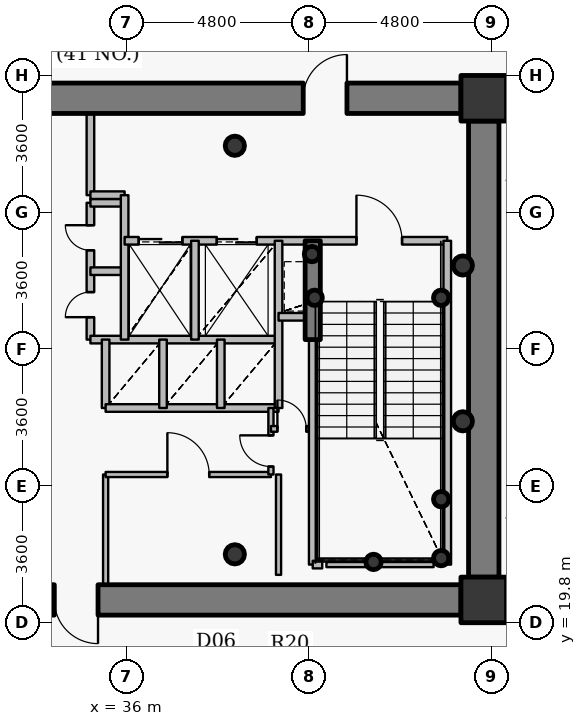
"""IFC4 building model, lengths in metres.
Left out: names, types, materials, properties, quantities, classifications, styles, units other than length and angle.
Written with IfcOpenShell. Run it as: python <this file> out.ifc"""

import sys

from ifc_helpers import new_model, si_unit, direction, frame, frame_2d, origin, origin_2d, place, context, subcontext, project, spatial, rectangle, hollow_circle, extrude, source, transform, mapped, element, fill, save


model = new_model("IFC4")
c1 = context("Model", 3, precision=1e-05, world=origin(), true_north=direction((0.0, 1.0)))
c2 = subcontext(c1, "Body", "Model", "MODEL_VIEW")
j1 = project(units=[si_unit("LENGTHUNIT", "METRE"), si_unit("PLANEANGLEUNIT", "RADIAN")], contexts=[c1])
p1 = place(None, origin())
s1 = spatial("IfcSite", under=j1, at=p1, CompositionType="ELEMENT")
p2 = place(p1, origin())
s2 = spatial("IfcBuilding", under=s1, at=p2, CompositionType="ELEMENT")
p3 = place(p2, frame((0.0, 0.0, 167.4)))
s3 = spatial("IfcBuildingStorey", under=s2, at=p3, CompositionType="ELEMENT", Elevation=167.4)
for number, where, z_axis, x_axis in (
    (1, (45.4, 20.4, 0.0), (0.0, 0.0, 1.0), (1.0, 0.0, 0.0)),
    (2, (45.4, 33.6, 0.0), (0.0, 0.0, 1.0), (1.0, 0.0, 0.0)),
):
    element("IfcColumn", number, at=place(p3, frame(where, z_axis=z_axis, x_axis=x_axis)), inside=s3, PredefinedType="COLUMN", context=c2, shape_type="SweptSolid", body=[
        extrude(rectangle(XDim=1.2, YDim=1.2, at=origin_2d()), origin(), (0.0, 0.0, 1.0), 3.75),
    ])
for number, where, z_axis, x_axis in (
    (3, (38.85, 21.6, 0.0), (0.0, 0.0, 1.0), (1.0, 0.0, 0.0)),
    (4, (38.85, 32.35, 0.0), (0.0, 0.0, 1.0), (1.0, 0.0, 0.0)),
):
    element("IfcColumn", number, at=place(p3, frame(where, z_axis=z_axis, x_axis=x_axis)), inside=s3, PredefinedType="COLUMN", context=c2, shape_type="SweptSolid", body=[
        extrude(hollow_circle(Radius=0.254, WallThickness=0.02, at=origin_2d()), origin(), (0.0, 0.0, 1.0), 3.75),
    ])
for number, where, z_axis, x_axis in (
    (5, (44.28, 21.5, 0.0), (0.0, 0.0, 1.0), (1.0, 0.0, 0.0)),
    (6, (44.28, 23.05, 0.0), (0.0, 0.0, 1.0), (1.0, 0.0, 0.0)),
    (7, (42.5, 21.4, 0.0), (0.0, 0.0, 1.0), (1.0, 0.0, 0.0)),
    (8, (40.95, 28.35, 0.0), (0.0, 0.0, 1.0), (1.0, 0.0, 0.0)),
    (9, (44.28, 28.35, 0.0), (0.0, 0.0, 1.0), (1.0, 0.0, 0.0)),
    (10, (40.88, 29.5, 0.0), (0.0, 0.0, 1.0), (1.0, 0.0, 0.0)),
):
    element("IfcColumn", number, at=place(p3, frame(where, z_axis=z_axis, x_axis=x_axis)), inside=s3, PredefinedType="COLUMN", context=c2, shape_type="SweptSolid", body=[
        extrude(hollow_circle(Radius=0.203, WallThickness=0.016, at=origin_2d()), origin(), (0.0, 0.0, 1.0), 3.75),
    ])
p4 = place(p3, frame((27.2, 33.6, 0.0), z_axis=(0.0, 0.0, 1.0), x_axis=(1.0, 0.0, 0.0)))
e11 = element("IfcWall", 11, at=p4, inside=s3, PredefinedType="SHEAR", context=c2, shape_type="SweptSolid", body=[
    extrude(rectangle(XDim=17.6, YDim=0.8, at=frame_2d((8.8, 0.0))), origin(), (0.0, 0.0, 1.0), 2.95),
])
p5 = place(p4, frame((13.45, 0.0, 0.0)))
e12 = element("IfcOpeningElement", 12, at=p5, cuts=e11, PredefinedType="OPENING", context=c2, shape_type="SweptSolid", body=[
    extrude(rectangle(XDim=1.15, YDim=2.15, at=origin_2d()), frame((0.575, 0.41, 1.075), z_axis=(0.0, -1.0, 0.0), x_axis=(1.0, 0.0, 0.0)), (0.0, 0.0, 1.0), 0.82),
])
p6 = place(p3, frame((45.4, 33.0, 0.0), z_axis=(0.0, 0.0, 1.0), x_axis=(0.0, -1.0, 0.0)))
e13 = element("IfcWall", 13, at=p6, inside=s3, PredefinedType="SHEAR", context=c2, shape_type="SweptSolid", body=[
    extrude(rectangle(XDim=12.0, YDim=0.8, at=frame_2d((6.0, 0.0))), origin(), (0.0, 0.0, 1.0), 2.95),
])
p7 = place(p3, frame((44.8, 20.4, 0.0), z_axis=(0.0, 0.0, 1.0), x_axis=(-1.0, 0.0, 0.0)))
e14 = element("IfcWall", 14, at=p7, inside=s3, PredefinedType="SHEAR", context=c2, shape_type="SweptSolid", body=[
    extrude(rectangle(XDim=17.6, YDim=0.8, at=frame_2d((8.8, 0.0))), origin(), (0.0, 0.0, 1.0), 2.95),
])
p8 = place(p7, frame((9.55, 0.0, 0.0)))
e15 = element("IfcOpeningElement", 15, at=p8, cuts=e14, PredefinedType="OPENING", context=c2, shape_type="SweptSolid", body=[
    extrude(rectangle(XDim=1.15, YDim=2.15, at=origin_2d()), frame((0.575, 0.41, 1.075), z_axis=(0.0, -1.0, 0.0), x_axis=(1.0, 0.0, 0.0)), (0.0, 0.0, 1.0), 0.82),
])
p9 = place(p3, frame((40.9, 27.25, 0.0), z_axis=(0.0, 0.0, 1.0), x_axis=(0.0, 1.0, 0.0)))
e16 = element("IfcWall", 16, at=p9, inside=s3, PredefinedType="SHEAR", context=c2, shape_type="SweptSolid", body=[
    extrude(rectangle(XDim=2.6, YDim=0.4, at=frame_2d((1.3, 0.0))), origin(), (0.0, 0.0, 1.0), 3.1),
])
for number, where, z_axis, x_axis in (
    (17, (44.85, 25.1, 0.0), (0.0, 0.0, 1.0), (1.0, 0.0, 0.0)),
    (18, (44.85, 29.2, 0.0), (0.0, 0.0, 1.0), (1.0, 0.0, 0.0)),
):
    element("IfcColumn", number, at=place(p3, frame(where, z_axis=z_axis, x_axis=x_axis)), inside=s3, PredefinedType="COLUMN", context=c2, shape_type="SweptSolid", body=[
        extrude(hollow_circle(Radius=0.254, WallThickness=0.02, at=origin_2d()), origin(), (0.0, 0.0, 1.0), 3.75),
    ])
p10 = place(p3, frame((35.05, 27.25, 0.0), z_axis=(0.0, 0.0, 1.0), x_axis=(0.0, 1.0, 0.0)))
e19 = element("IfcWall", 19, at=p10, inside=s3, PredefinedType="PARTITIONING", context=c2, shape_type="SweptSolid", body=[
    extrude(rectangle(XDim=3.6, YDim=0.2, at=frame_2d((1.8, 0.0))), origin(), (0.0, 0.0, 1.0), 3.5),
])
p11 = place(p10, frame((0.59, 0.0, 0.0)))
e20 = element("IfcOpeningElement", 20, at=p11, cuts=e19, PredefinedType="OPENING", context=c2, shape_type="SweptSolid", body=[
    extrude(rectangle(XDim=0.66, YDim=2.05, at=origin_2d()), frame((0.33, 0.11, 1.025), z_axis=(0.0, -1.0, 0.0), x_axis=(1.0, 0.0, 0.0)), (0.0, 0.0, 1.0), 0.22),
])
p12 = place(p10, frame((2.35, 0.0, 0.0)))
e21 = element("IfcOpeningElement", 21, at=p12, cuts=e19, PredefinedType="OPENING", context=c2, shape_type="SweptSolid", body=[
    extrude(rectangle(XDim=0.66, YDim=2.05, at=origin_2d()), frame((0.33, 0.11, 1.025), z_axis=(0.0, -1.0, 0.0), x_axis=(1.0, 0.0, 0.0)), (0.0, 0.0, 1.0), 0.22),
])
p13 = place(p3, frame((35.05, 27.25, 0.0), z_axis=(0.0, 0.0, 1.0), x_axis=(1.0, 0.0, 0.0)))
e22 = element("IfcWall", 22, at=p13, inside=s3, PredefinedType="PARTITIONING", context=c2, shape_type="SweptSolid", body=[
    extrude(rectangle(XDim=4.95, YDim=0.2, at=frame_2d((2.475, 0.0))), origin(), (0.0, 0.0, 1.0), 3.085),
])
for number, where, z_axis, x_axis in (
    (23, (35.05, 29.05, 0.0), (0.0, 0.0, 1.0), (1.0, 0.0, 0.0)),
    (24, (35.05, 30.85, 0.0), (0.0, 0.0, 1.0), (1.0, 0.0, 0.0)),
):
    element("IfcWall", number, at=place(p3, frame(where, z_axis=z_axis, x_axis=x_axis)), inside=s3, PredefinedType="PARTITIONING", context=c2, shape_type="SweptSolid", body=[
        extrude(rectangle(XDim=0.9, YDim=0.2, at=frame_2d((0.45, 0.0))), origin(), (0.0, 0.0, 1.0), 3.5),
    ])
p14 = place(p3, frame((35.05, 31.05, 0.0), z_axis=(0.0, 0.0, 1.0), x_axis=(0.0, 1.0, 0.0)))
e25 = element("IfcWall", 25, at=p14, inside=s3, PredefinedType="PARTITIONING", context=c2, shape_type="SweptSolid", body=[
    extrude(rectangle(XDim=2.15, YDim=0.2, at=frame_2d((1.075, 0.0))), origin(), (0.0, 0.0, 1.0), 3.085),
])
p15 = place(p3, frame((35.05, 31.05, 0.0), z_axis=(0.0, 0.0, 1.0), x_axis=(1.0, 0.0, 0.0)))
e26 = element("IfcWall", 26, at=p15, inside=s3, PredefinedType="PARTITIONING", context=c2, shape_type="SweptSolid", body=[
    extrude(rectangle(XDim=0.9, YDim=0.2, at=frame_2d((0.45, 0.0))), origin(), (0.0, 0.0, 1.0), 3.5),
])
p16 = place(p3, frame((35.45, 20.8, 0.0), z_axis=(0.0, 0.0, 1.0), x_axis=(0.0, 1.0, 0.0)))
e27 = element("IfcWall", 27, at=p16, inside=s3, PredefinedType="PARTITIONING", context=c2, shape_type="SweptSolid", body=[
    extrude(rectangle(XDim=2.9, YDim=0.135, at=frame_2d((1.45, 0.0))), origin(), (0.0, 0.0, 1.0), 3.085),
])
p17 = place(p3, frame((35.45, 23.7, 0.0), z_axis=(0.0, 0.0, 1.0), x_axis=(1.0, 0.0, 0.0)))
e28 = element("IfcWall", 28, at=p17, inside=s3, PredefinedType="PARTITIONING", context=c2, shape_type="SweptSolid", body=[
    extrude(rectangle(XDim=4.35, YDim=0.135, at=frame_2d((2.175, 0.0))), origin(), (0.0, 0.0, 1.0), 3.085),
])
p18 = place(p17, frame((1.625, 0.0, 0.0)))
e29 = element("IfcOpeningElement", 29, at=p18, cuts=e28, PredefinedType="OPENING", context=c2, shape_type="SweptSolid", body=[
    extrude(rectangle(XDim=1.1, YDim=2.15, at=origin_2d()), frame((0.55, 0.078, 1.075), z_axis=(0.0, -1.0, 0.0), x_axis=(1.0, 0.0, 0.0)), (0.0, 0.0, 1.0), 0.155),
])
p19 = place(p3, frame((35.45, 25.45, 0.0), z_axis=(0.0, 0.0, 1.0), x_axis=(0.0, 1.0, 0.0)))
e30 = element("IfcWall", 30, at=p19, inside=s3, PredefinedType="PARTITIONING", context=c2, shape_type="SweptSolid", body=[
    extrude(rectangle(XDim=1.8, YDim=0.2, at=frame_2d((0.9, 0.0))), origin(), (0.0, 0.0, 1.0), 3.5),
])
p20 = place(p3, frame((35.45, 25.45, 0.0), z_axis=(0.0, 0.0, 1.0), x_axis=(1.0, 0.0, 0.0)))
e31 = element("IfcWall", 31, at=p20, inside=s3, PredefinedType="PARTITIONING", context=c2, shape_type="SweptSolid", body=[
    extrude(rectangle(XDim=4.55, YDim=0.2, at=frame_2d((2.275, 0.0))), origin(), (0.0, 0.0, 1.0), 3.085),
])
p21 = place(p3, frame((35.95, 27.25, 0.0), z_axis=(0.0, 0.0, 1.0), x_axis=(0.0, 1.0, 0.0)))
e32 = element("IfcWall", 32, at=p21, inside=s3, PredefinedType="PARTITIONING", context=c2, shape_type="SweptSolid", body=[
    extrude(rectangle(XDim=3.8, YDim=0.2, at=frame_2d((1.9, 0.0))), origin(), (0.0, 0.0, 1.0), 3.5),
])
p22 = place(p3, frame((35.95, 29.85, 0.0), z_axis=(0.0, 0.0, 1.0), x_axis=(1.0, 0.0, 0.0)))
e33 = element("IfcWall", 33, at=p22, inside=s3, PredefinedType="PARTITIONING", context=c2, shape_type="SweptSolid", body=[
    extrude(rectangle(XDim=8.49, YDim=0.2, at=frame_2d((4.245, 0.0))), origin(), (0.0, 0.0, 1.0), 3.085),
])
p23 = place(p22, frame((6.1, 0.0, 0.0)))
e34 = element("IfcOpeningElement", 34, at=p23, cuts=e33, PredefinedType="OPENING", context=c2, shape_type="SweptSolid", body=[
    extrude(rectangle(XDim=1.2, YDim=2.15, at=origin_2d()), frame((0.6, 0.11, 1.075), z_axis=(0.0, -1.0, 0.0), x_axis=(1.0, 0.0, 0.0)), (0.0, 0.0, 1.0), 0.22),
])
p24 = place(p22, frame((0.37, 0.0, 0.0)))
e35 = element("IfcOpeningElement", 35, at=p24, cuts=e33, PredefinedType="OPENING", context=c2, shape_type="SweptSolid", body=[
    extrude(rectangle(XDim=1.15, YDim=2.15, at=origin_2d()), frame((0.575, 0.11, 1.075), z_axis=(0.0, -1.0, 0.0), x_axis=(1.0, 0.0, 0.0)), (0.0, 0.0, 1.0), 0.22),
])
p25 = place(p22, frame((2.425, 0.0, 0.0)))
e36 = element("IfcOpeningElement", 36, at=p25, cuts=e33, PredefinedType="OPENING", context=c2, shape_type="SweptSolid", body=[
    extrude(rectangle(XDim=1.05, YDim=2.15, at=origin_2d()), frame((0.525, 0.11, 1.075), z_axis=(0.0, -1.0, 0.0), x_axis=(1.0, 0.0, 0.0)), (0.0, 0.0, 1.0), 0.22),
])
p26 = place(p3, frame((36.96, 25.45, 0.0), z_axis=(0.0, 0.0, 1.0), x_axis=(0.0, 1.0, 0.0)))
e37 = element("IfcWall", 37, at=p26, inside=s3, PredefinedType="PARTITIONING", context=c2, shape_type="SweptSolid", body=[
    extrude(rectangle(XDim=1.8, YDim=0.2, at=frame_2d((0.9, 0.0))), origin(), (0.0, 0.0, 1.0), 3.5),
])
p27 = place(p3, frame((37.8, 27.25, 0.0), z_axis=(0.0, 0.0, 1.0), x_axis=(0.0, 1.0, 0.0)))
e38 = element("IfcWall", 38, at=p27, inside=s3, PredefinedType="PARTITIONING", context=c2, shape_type="SweptSolid", body=[
    extrude(rectangle(XDim=2.6, YDim=0.2, at=frame_2d((1.3, 0.0))), origin(), (0.0, 0.0, 1.0), 3.5),
])
p28 = place(p3, frame((38.48, 25.45, 0.0), z_axis=(0.0, 0.0, 1.0), x_axis=(0.0, 1.0, 0.0)))
e39 = element("IfcWall", 39, at=p28, inside=s3, PredefinedType="PARTITIONING", context=c2, shape_type="SweptSolid", body=[
    extrude(rectangle(XDim=1.8, YDim=0.2, at=frame_2d((0.9, 0.0))), origin(), (0.0, 0.0, 1.0), 3.5),
])
p29 = place(p3, frame((39.8, 23.7, 0.0), z_axis=(0.0, 0.0, 1.0), x_axis=(0.0, 1.0, 0.0)))
e40 = element("IfcWall", 40, at=p29, inside=s3, PredefinedType="PARTITIONING", context=c2, shape_type="SweptSolid", body=[
    extrude(rectangle(XDim=1.75, YDim=0.135, at=frame_2d((0.875, 0.0))), origin(), (0.0, 0.0, 1.0), 3.5),
])
p30 = place(p29, frame((0.21, 0.0, 0.0)))
e41 = element("IfcOpeningElement", 41, at=p30, cuts=e40, PredefinedType="OPENING", context=c2, shape_type="SweptSolid", body=[
    extrude(rectangle(XDim=0.82, YDim=2.1, at=origin_2d()), frame((0.41, 0.078, 1.05), z_axis=(0.0, -1.0, 0.0), x_axis=(1.0, 0.0, 0.0)), (0.0, 0.0, 1.0), 0.155),
])
p31 = place(p3, frame((39.8, 24.9, 0.0), z_axis=(0.0, 0.0, 1.0), x_axis=(1.0, 0.0, 0.0)))
e42 = element("IfcWall", 42, at=p31, inside=s3, PredefinedType="PARTITIONING", context=c2, shape_type="SweptSolid", body=[
    extrude(rectangle(XDim=1.1, YDim=0.15, at=frame_2d((0.55, 0.0))), origin(), (0.0, 0.0, 1.0), 3.5),
])
p32 = place(p31, frame((0.17, 0.0, 0.0)))
e43 = element("IfcOpeningElement", 43, at=p32, cuts=e42, PredefinedType="OPENING", context=c2, shape_type="SweptSolid", body=[
    extrude(rectangle(XDim=0.76, YDim=2.1, at=origin_2d()), frame((0.38, 0.085, 1.05), z_axis=(0.0, -1.0, 0.0), x_axis=(1.0, 0.0, 0.0)), (0.0, 0.0, 1.0), 0.17),
])
p33 = place(p3, frame((40.0, 25.45, 0.0), z_axis=(0.0, 0.0, 1.0), x_axis=(0.0, 1.0, 0.0)))
e44 = element("IfcWall", 44, at=p33, inside=s3, PredefinedType="PARTITIONING", context=c2, shape_type="SweptSolid", body=[
    extrude(rectangle(XDim=4.4, YDim=0.2, at=frame_2d((2.2, 0.0))), origin(), (0.0, 0.0, 1.0), 3.5),
])
p34 = place(p3, frame((40.0, 27.85, 0.0), z_axis=(0.0, 0.0, 1.0), x_axis=(1.0, 0.0, 0.0)))
e45 = element("IfcWall", 45, at=p34, inside=s3, PredefinedType="PARTITIONING", context=c2, shape_type="SweptSolid", body=[
    extrude(rectangle(XDim=0.9, YDim=0.2, at=frame_2d((0.45, 0.0))), origin(), (0.0, 0.0, 1.0), 3.5),
])
p35 = place(p3, frame((40.9, 21.33, 0.0), z_axis=(0.0, 0.0, 1.0), x_axis=(0.0, 1.0, 0.0)))
e46 = element("IfcWall", 46, at=p35, inside=s3, PredefinedType="PARTITIONING", context=c2, shape_type="SweptSolid", body=[
    extrude(rectangle(XDim=5.91, YDim=0.2, at=frame_2d((2.955, 0.0))), origin(), (0.0, 0.0, 1.0), 3.035),
])
p36 = place(p3, frame((40.9, 21.33, 0.0), z_axis=(0.0, 0.0, 1.0), x_axis=(1.0, 0.0, 0.0)))
e47 = element("IfcWall", 47, at=p36, inside=s3, PredefinedType="PARTITIONING", context=c2, shape_type="SweptSolid", body=[
    extrude(rectangle(XDim=0.25, YDim=0.2, at=frame_2d((0.125, 0.0))), origin(), (0.0, 0.0, 1.0), 3.035),
])
p37 = place(p3, frame((44.44, 21.33, 0.0), z_axis=(0.0, 0.0, 1.0), x_axis=(0.0, 1.0, 0.0)))
e48 = element("IfcWall", 48, at=p37, inside=s3, PredefinedType="PARTITIONING", context=c2, shape_type="SweptSolid", body=[
    extrude(rectangle(XDim=8.52, YDim=0.2, at=frame_2d((4.26, 0.0))), origin(), (0.0, 0.0, 1.0), 3.5),
])
p38 = place(p3, frame((45.8, 20.05, 0.0), z_axis=(0.0, 0.0, 1.0), x_axis=(1.0, 0.0, 0.0)))
e49 = element("IfcWall", 49, at=p38, inside=s3, PredefinedType="PARTITIONING", context=c2, shape_type="SweptSolid", body=[
    extrude(rectangle(XDim=2.4, YDim=0.135, at=frame_2d((1.2, 0.0))), origin(), (0.0, 0.0, 1.0), 3.5),
])
p39 = place(p3, frame((45.8, 33.95, 0.0), z_axis=(0.0, 0.0, 1.0), x_axis=(1.0, 0.0, 0.0)))
e50 = element("IfcWall", 50, at=p39, inside=s3, PredefinedType="PARTITIONING", context=c2, shape_type="SweptSolid", body=[
    extrude(rectangle(XDim=6.318, YDim=0.135, at=frame_2d((3.159, 0.0))), origin(), (0.0, 0.0, 1.0), 3.5),
])
p40 = place(p3, frame((44.08, 21.33, 0.0), z_axis=(0.0, 0.0, 1.0), x_axis=(-1.0, 0.0, 0.0)))
e51 = element("IfcWall", 51, at=p40, inside=s3, PredefinedType="PARTITIONING", context=c2, shape_type="SweptSolid", body=[
    extrude(rectangle(XDim=2.82, YDim=0.135, at=frame_2d((1.41, 0.0))), origin(), (0.0, 0.0, 1.0), 3.035),
])
p41 = place(p3, frame((40.0, 23.7, 0.0), z_axis=(0.0, 0.0, 1.0), x_axis=(0.0, -1.0, 0.0)))
e52 = element("IfcWall", 52, at=p41, inside=s3, PredefinedType="PARTITIONING", context=c2, shape_type="SweptSolid", body=[
    extrude(rectangle(XDim=2.64, YDim=0.135, at=frame_2d((1.32, 0.0))), origin(), (0.0, 0.0, 1.0), 3.035),
])
for number, where, z_axis, x_axis in (
    (53, (45.79, 34.0, 0.0), (0.0, 0.0, 1.0), (-1.0, 0.0, 0.0)),
    (54, (44.81, 20.0, 0.0), (0.0, 0.0, 1.0), (1.0, 0.0, 0.0)),
):
    element("IfcWall", number, at=place(p3, frame(where, z_axis=z_axis, x_axis=x_axis)), inside=s3, PredefinedType="PARTITIONING", context=c2, shape_type="SweptSolid", body=[
        extrude(rectangle(XDim=0.98, YDim=0.135, at=frame_2d((0.49, 0.0))), origin(), (0.0, 0.0, 1.0), 2.935),
    ])
for number, where, z_axis, x_axis in (
    (55, (45.8, 20.377, 0.0), (0.0, 0.0, 1.0), (0.0, 1.0, 0.0)),
    (56, (45.8, 33.01, 0.0), (0.0, 0.0, 1.0), (0.0, 1.0, 0.0)),
):
    element("IfcWall", number, at=place(p3, frame(where, z_axis=z_axis, x_axis=x_axis)), inside=s3, PredefinedType="PARTITIONING", context=c2, shape_type="SweptSolid", body=[
        extrude(rectangle(XDim=0.613, YDim=0.135, at=frame_2d((0.306, 0.0))), origin(), (0.0, 0.0, 1.0), 3.5),
    ])
m1 = source(origin(), c2, "Body", "SweptSolid", [
    extrude(rectangle(XDim=1.15, YDim=2.15, at=origin_2d()), frame((0.575, 0.025, 1.075), z_axis=(0.0, -1.0, 0.0), x_axis=(1.0, 0.0, 0.0)), (0.0, 0.0, 1.0), 0.05),
])
p42 = place(p5, origin())
e57 = element("IfcDoor", 57, at=p42, inside=s3, OperationType="SINGLE_SWING_RIGHT", PredefinedType="DOOR", context=c2, shape_type="MappedRepresentation", body=[
    mapped(m1, transform((0.0, 0.0, 0.0), x_axis=(1.0, 0.0, 0.0), y_axis=(0.0, 1.0, 0.0), z_axis=(0.0, 0.0, 1.0), scale=1.0)),
])
fill(e12, e57)
p43 = place(p8, origin())
e58 = element("IfcDoor", 58, at=p43, inside=s3, OperationType="SINGLE_SWING_LEFT", PredefinedType="DOOR", context=c2, shape_type="MappedRepresentation", body=[
    mapped(m1, transform((0.0, 0.0, 0.0), x_axis=(1.0, 0.0, 0.0), y_axis=(0.0, 1.0, 0.0), z_axis=(0.0, 0.0, 1.0), scale=1.0)),
])
fill(e15, e58)
m2 = source(origin(), c2, "Body", "SweptSolid", [
    extrude(rectangle(XDim=1.2, YDim=2.15, at=origin_2d()), frame((0.6, 0.025, 1.075), z_axis=(0.0, -1.0, 0.0), x_axis=(1.0, 0.0, 0.0)), (0.0, 0.0, 1.0), 0.05),
])
p44 = place(p23, origin())
e59 = element("IfcDoor", 59, at=p44, inside=s3, OperationType="SINGLE_SWING_LEFT", PredefinedType="DOOR", context=c2, shape_type="MappedRepresentation", body=[
    mapped(m2, transform((0.0, 0.0, 0.0), x_axis=(1.0, 0.0, 0.0), y_axis=(0.0, 1.0, 0.0), z_axis=(0.0, 0.0, 1.0), scale=1.0)),
])
fill(e34, e59)
m3 = source(origin(), c2, "Body", "SweptSolid", [
    extrude(rectangle(XDim=1.15, YDim=2.15, at=origin_2d()), frame((0.575, 0.025, 1.075), z_axis=(0.0, -1.0, 0.0), x_axis=(1.0, 0.0, 0.0)), (0.0, 0.0, 1.0), 0.05),
])
p45 = place(p24, origin())
e60 = element("IfcDoor", 60, at=p45, inside=s3, OperationType="DOUBLE_DOOR_SLIDING", PredefinedType="USERDEFINED", context=c2, shape_type="MappedRepresentation", body=[
    mapped(m3, transform((0.0, 0.0, 0.0), x_axis=(1.0, 0.0, 0.0), y_axis=(0.0, 1.0, 0.0), z_axis=(0.0, 0.0, 1.0), scale=1.0)),
])
fill(e35, e60)
m4 = source(origin(), c2, "Body", "SweptSolid", [
    extrude(rectangle(XDim=1.05, YDim=2.15, at=origin_2d()), frame((0.525, 0.025, 1.075), z_axis=(0.0, -1.0, 0.0), x_axis=(1.0, 0.0, 0.0)), (0.0, 0.0, 1.0), 0.05),
])
p46 = place(p25, origin())
e61 = element("IfcDoor", 61, at=p46, inside=s3, OperationType="DOUBLE_DOOR_SLIDING", PredefinedType="USERDEFINED", context=c2, shape_type="MappedRepresentation", body=[
    mapped(m4, transform((0.0, 0.0, 0.0), x_axis=(1.0, 0.0, 0.0), y_axis=(0.0, 1.0, 0.0), z_axis=(0.0, 0.0, 1.0), scale=1.0)),
])
fill(e36, e61)
m5 = source(origin(), c2, "Body", "SweptSolid", [
    extrude(rectangle(XDim=0.66, YDim=2.05, at=origin_2d()), frame((0.33, 0.025, 1.025), z_axis=(0.0, -1.0, 0.0), x_axis=(1.0, 0.0, 0.0)), (0.0, 0.0, 1.0), 0.05),
])
p47 = place(p11, origin())
e62 = element("IfcDoor", 62, at=p47, inside=s3, OperationType="SINGLE_SWING_LEFT", PredefinedType="USERDEFINED", context=c2, shape_type="MappedRepresentation", body=[
    mapped(m5, transform((0.0, 0.0, 0.0), x_axis=(1.0, 0.0, 0.0), y_axis=(0.0, 1.0, 0.0), z_axis=(0.0, 0.0, 1.0), scale=1.0)),
])
fill(e20, e62)
p48 = place(p12, origin())
e63 = element("IfcDoor", 63, at=p48, inside=s3, OperationType="SINGLE_SWING_RIGHT", PredefinedType="USERDEFINED", context=c2, shape_type="MappedRepresentation", body=[
    mapped(m5, transform((0.0, 0.0, 0.0), x_axis=(1.0, 0.0, 0.0), y_axis=(0.0, 1.0, 0.0), z_axis=(0.0, 0.0, 1.0), scale=1.0)),
])
fill(e21, e63)
m6 = source(origin(), c2, "Body", "SweptSolid", [
    extrude(rectangle(XDim=1.1, YDim=2.15, at=origin_2d()), frame((0.55, 0.025, 1.075), z_axis=(0.0, -1.0, 0.0), x_axis=(1.0, 0.0, 0.0)), (0.0, 0.0, 1.0), 0.05),
])
p49 = place(p18, origin())
e64 = element("IfcDoor", 64, at=p49, inside=s3, OperationType="SINGLE_SWING_LEFT", PredefinedType="DOOR", context=c2, shape_type="MappedRepresentation", body=[
    mapped(m6, transform((0.0, 0.0, 0.0), x_axis=(1.0, 0.0, 0.0), y_axis=(0.0, 1.0, 0.0), z_axis=(0.0, 0.0, 1.0), scale=1.0)),
])
fill(e29, e64)
m7 = source(origin(), c2, "Body", "SweptSolid", [
    extrude(rectangle(XDim=0.82, YDim=2.1, at=origin_2d()), frame((0.41, 0.025, 1.05), z_axis=(0.0, -1.0, 0.0), x_axis=(1.0, 0.0, 0.0)), (0.0, 0.0, 1.0), 0.05),
])
p50 = place(p30, origin())
e65 = element("IfcDoor", 65, at=p50, inside=s3, OperationType="SINGLE_SWING_RIGHT", PredefinedType="DOOR", context=c2, shape_type="MappedRepresentation", body=[
    mapped(m7, transform((0.0, 0.0, 0.0), x_axis=(1.0, 0.0, 0.0), y_axis=(0.0, 1.0, 0.0), z_axis=(0.0, 0.0, 1.0), scale=1.0)),
])
fill(e41, e65)
m8 = source(origin(), c2, "Body", "SweptSolid", [
    extrude(rectangle(XDim=0.76, YDim=2.1, at=origin_2d()), frame((0.38, 0.025, 1.05), z_axis=(0.0, -1.0, 0.0), x_axis=(1.0, 0.0, 0.0)), (0.0, 0.0, 1.0), 0.05),
])
p51 = place(p32, origin())
e66 = element("IfcDoor", 66, at=p51, inside=s3, OperationType="SINGLE_SWING_LEFT", PredefinedType="DOOR", context=c2, shape_type="MappedRepresentation", body=[
    mapped(m8, transform((0.0, 0.0, 0.0), x_axis=(1.0, 0.0, 0.0), y_axis=(0.0, 1.0, 0.0), z_axis=(0.0, 0.0, 1.0), scale=1.0)),
])
fill(e43, e66)
save(model, sys.argv[1])
